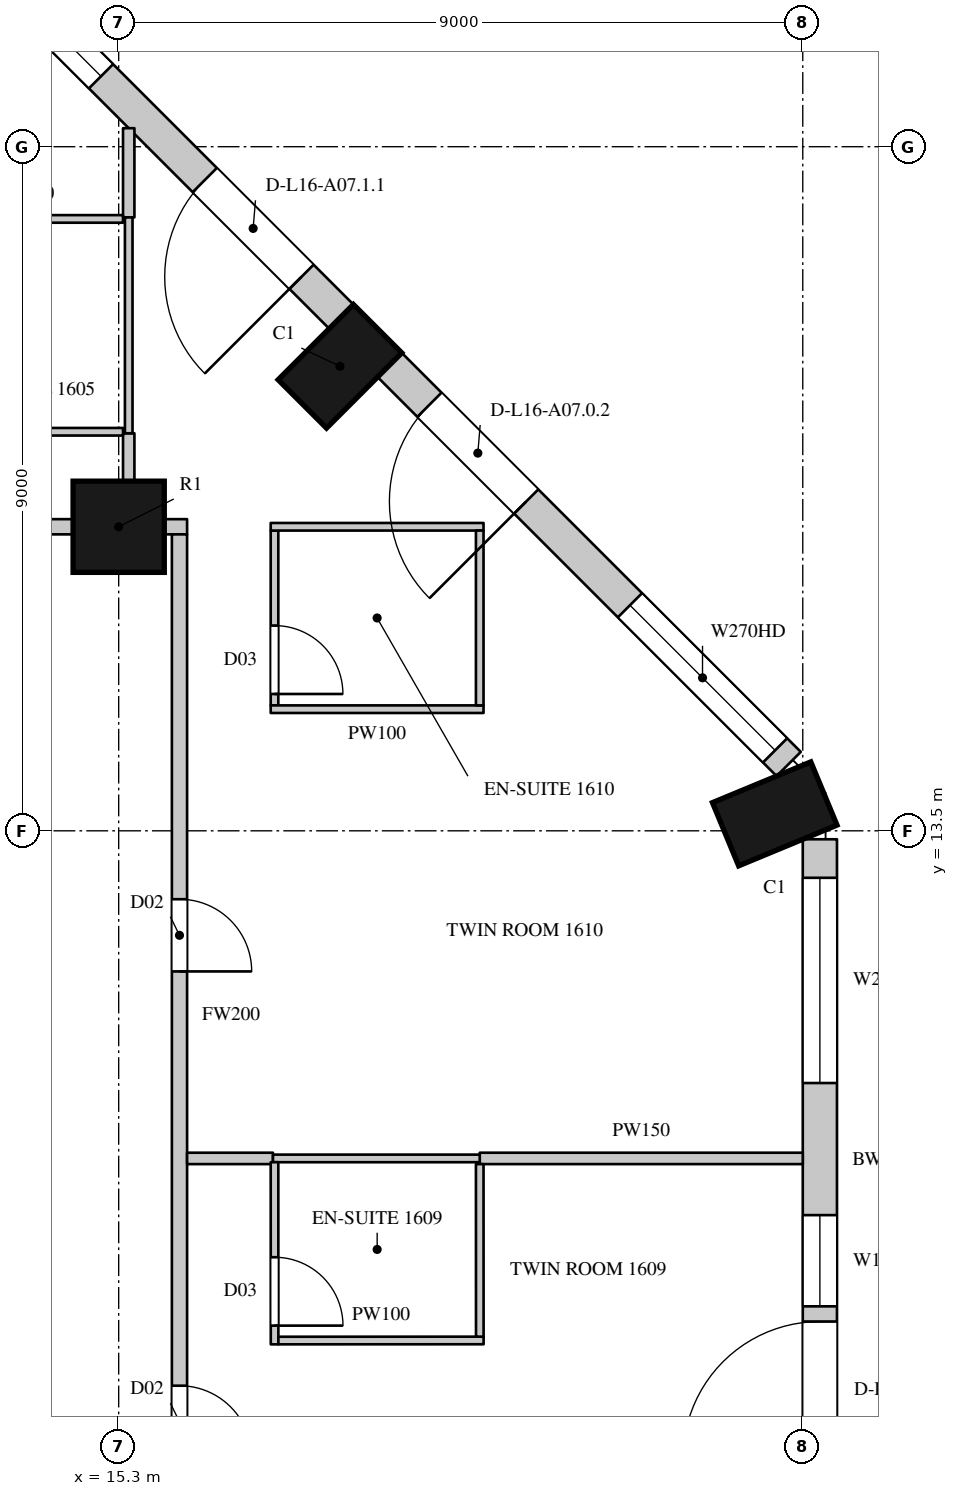
"""IFC4 building model, lengths in metres.
Left out: names, types, materials, properties, quantities, classifications, styles, units other than length and angle.
Written with IfcOpenShell. Run it as: python <this file> out.ifc"""

import sys

from ifc_helpers import new_model, si_unit, direction, frame, frame_2d, origin, origin_2d, place, context, subcontext, project, spatial, rectangle, circle, extrude, element, fill, save


model = new_model("IFC4")
c1 = context("Model", 3, precision=1e-05, world=origin(), true_north=direction((0.0, 1.0)))
c2 = subcontext(c1, "Body", "Model", "MODEL_VIEW")
j1 = project(units=[si_unit("LENGTHUNIT", "METRE"), si_unit("PLANEANGLEUNIT", "RADIAN")], contexts=[c1])
p1 = place(None, origin())
s1 = spatial("IfcSite", under=j1, at=p1, CompositionType="ELEMENT")
p2 = place(p1, origin())
s2 = spatial("IfcBuilding", under=s1, at=p2, CompositionType="ELEMENT")
p3 = place(p2, frame((0.0, 0.0, 87.9)))
s3 = spatial("IfcBuildingStorey", under=s2, at=p3, CompositionType="ELEMENT", Elevation=87.9)
for number, where, z_axis, x_axis in (
    (1, (23.931, 13.723, 0.0), (0.0, 0.0, 1.0), (-0.383, 0.924, 0.0)),
    (2, (18.211, 19.611, 0.0), (0.0, 0.0, 1.0), (-0.707, 0.707, 0.0)),
):
    element("IfcColumn", number, at=place(p3, frame(where, z_axis=z_axis, x_axis=x_axis)), inside=s3, PredefinedType="COLUMN", context=c2, shape_type="SweptSolid", body=[
        extrude(rectangle(XDim=0.9, YDim=1.4, at=origin_2d()), origin(), (0.0, 0.0, 1.0), 3.6),
    ])
p4 = place(p3, frame((15.3, 17.5, 0.0), z_axis=(0.0, 0.0, 1.0), x_axis=(1.0, 0.0, 0.0)))
e3 = element("IfcColumn", 3, at=p4, inside=s3, PredefinedType="COLUMN", context=c2, shape_type="SweptSolid", body=[
    extrude(circle(Radius=0.6, at=origin_2d()), origin(), (0.0, 0.0, 1.0), 3.6),
])
p5 = place(p3, frame((24.525, 4.95, 0.0), z_axis=(0.0, 0.0, 1.0), x_axis=(0.0, 1.0, 0.0)))
e4 = element("IfcWall", 4, at=p5, inside=s3, PredefinedType="SOLIDWALL", context=c2, shape_type="SweptSolid", body=[
    extrude(rectangle(XDim=8.439, YDim=0.45, at=frame_2d((4.219, 0.0))), origin(), (0.0, 0.0, 1.0), 3.3),
])
p6 = place(p5, frame((0.294, 0.0, 0.0)))
e5 = element("IfcOpeningElement", 5, at=p6, cuts=e4, PredefinedType="OPENING", context=c2, shape_type="SweptSolid", body=[
    extrude(rectangle(XDim=1.8, YDim=2.4, at=frame_2d((0.9, 1.2))), frame((0.0, 0.235, 0.0), z_axis=(0.0, -1.0, 0.0), x_axis=(1.0, 0.0, 0.0)), (0.0, 0.0, 1.0), 0.47),
])
p7 = place(p5, frame((2.294, 0.0, 1.05)))
e6 = element("IfcOpeningElement", 6, at=p7, cuts=e4, PredefinedType="OPENING", context=c2, shape_type="SweptSolid", body=[
    extrude(rectangle(XDim=1.2, YDim=2.0, at=frame_2d((0.6, 1.0))), frame((0.0, 0.235, 0.0), z_axis=(0.0, -1.0, 0.0), x_axis=(1.0, 0.0, 0.0)), (0.0, 0.0, 1.0), 0.47),
])
p8 = place(p5, frame((5.232, 0.0, 1.05)))
e7 = element("IfcOpeningElement", 7, at=p8, cuts=e4, PredefinedType="OPENING", context=c2, shape_type="SweptSolid", body=[
    extrude(rectangle(XDim=2.7, YDim=2.0, at=frame_2d((1.35, 1.0))), frame((0.0, 0.235, 0.0), z_axis=(0.0, -1.0, 0.0), x_axis=(1.0, 0.0, 0.0)), (0.0, 0.0, 1.0), 0.47),
])
p9 = place(p3, frame((24.115, 14.379, 0.0), z_axis=(0.0, 0.0, 1.0), x_axis=(-0.707106781187, 0.707106781187, 0.0)))
e8 = element("IfcWall", 8, at=p9, inside=s3, PredefinedType="SOLIDWALL", context=c2, shape_type="SweptSolid", body=[
    extrude(rectangle(XDim=7.424, YDim=0.45, at=frame_2d((3.712, 0.0))), origin(), (0.0, 0.0, 1.0), 3.3),
])
p10 = place(p9, frame((0.253, 0.0, 1.05)))
e9 = element("IfcOpeningElement", 9, at=p10, cuts=e8, PredefinedType="OPENING", context=c2, shape_type="SweptSolid", body=[
    extrude(rectangle(XDim=2.7, YDim=2.0, at=frame_2d((1.35, 1.0))), frame((0.0, 0.235, 0.0), z_axis=(0.0, -1.0, 0.0), x_axis=(1.0, 0.0, 0.0)), (0.0, 0.0, 1.0), 0.47),
])
p11 = place(p9, frame((4.884, 0.0, 0.0)))
e10 = element("IfcOpeningElement", 10, at=p11, cuts=e8, PredefinedType="OPENING", context=c2, shape_type="SweptSolid", body=[
    extrude(rectangle(XDim=1.8, YDim=2.4, at=frame_2d((0.9, 1.2))), frame((0.0, 0.235, 0.0), z_axis=(0.0, -1.0, 0.0), x_axis=(1.0, 0.0, 0.0)), (0.0, 0.0, 1.0), 0.47),
])
p12 = place(p3, frame((18.229, 20.265, 0.0), z_axis=(0.0, 0.0, 1.0), x_axis=(-0.707106781187, 0.707106781187, 0.0)))
e11 = element("IfcWall", 11, at=p12, inside=s3, PredefinedType="SOLIDWALL", context=c2, shape_type="SweptSolid", body=[
    extrude(rectangle(XDim=7.424, YDim=0.45, at=frame_2d((3.712, 0.0))), origin(), (0.0, 0.0, 1.0), 3.3),
])
p13 = place(p12, frame((0.74, 0.0, 0.0)))
e12 = element("IfcOpeningElement", 12, at=p13, cuts=e11, PredefinedType="OPENING", context=c2, shape_type="SweptSolid", body=[
    extrude(rectangle(XDim=1.8, YDim=2.4, at=frame_2d((0.9, 1.2))), frame((0.0, 0.235, 0.0), z_axis=(0.0, -1.0, 0.0), x_axis=(1.0, 0.0, 0.0)), (0.0, 0.0, 1.0), 0.47),
])
p14 = place(p12, frame((4.471, 0.0, 1.05)))
e13 = element("IfcOpeningElement", 13, at=p14, cuts=e11, PredefinedType="OPENING", context=c2, shape_type="SweptSolid", body=[
    extrude(rectangle(XDim=2.7, YDim=2.0, at=frame_2d((1.35, 1.0))), frame((0.0, 0.235, 0.0), z_axis=(0.0, -1.0, 0.0), x_axis=(1.0, 0.0, 0.0)), (0.0, 0.0, 1.0), 0.47),
])
p15 = place(p3, frame((23.15, 16.864, 0.0), z_axis=(0.0, 0.0, 1.0), x_axis=(-0.707106781187, 0.707106781187, 0.0)))
e14 = element("IfcWall", 14, at=p15, inside=s3, PredefinedType="SOLIDWALL", context=c2, shape_type="SweptSolid", body=[
    extrude(rectangle(XDim=1.445, YDim=0.45, at=frame_2d((0.722, 0.0))), origin(), (0.0, 0.0, 1.0), 0.6),
])
p16 = place(p3, frame((19.937, 20.078, 0.0), z_axis=(0.0, 0.0, 1.0), x_axis=(-0.707106781187, 0.707106781187, 0.0)))
e15 = element("IfcWall", 15, at=p16, inside=s3, PredefinedType="SOLIDWALL", context=c2, shape_type="SweptSolid", body=[
    extrude(rectangle(XDim=1.781, YDim=0.45, at=frame_2d((0.89, 0.0))), origin(), (0.0, 0.0, 1.0), 0.6),
])
p17 = place(p3, frame((16.486, 23.529, 0.0), z_axis=(0.0, 0.0, 1.0), x_axis=(-0.707022305137, 0.707191247145, 0.0)))
e16 = element("IfcWall", 16, at=p17, inside=s3, PredefinedType="SOLIDWALL", context=c2, shape_type="SweptSolid", body=[
    extrude(rectangle(XDim=1.445, YDim=0.45, at=frame_2d((0.723, 0.0))), origin(), (0.0, 0.0, 1.0), 0.6),
])
p18 = place(p3, frame((6.9, 17.5, 0.0), z_axis=(0.0, 0.0, 1.0), x_axis=(1.0, 0.0, 0.0)))
e17 = element("IfcWall", 17, at=p18, inside=s3, PredefinedType="PARTITIONING", context=c2, shape_type="SweptSolid", body=[
    extrude(rectangle(XDim=7.8, YDim=0.2, at=frame_2d((3.9, 0.0))), origin(), (0.0, 0.0, 1.0), 2.75),
])
p19 = place(p18, frame((1.45, 0.0, 0.0)))
e18 = element("IfcOpeningElement", 18, at=p19, cuts=e17, PredefinedType="OPENING", context=c2, shape_type="SweptSolid", body=[
    extrude(rectangle(XDim=1.1, YDim=2.4, at=frame_2d((0.55, 1.2))), frame((0.0, 0.11, 0.0), z_axis=(0.0, -1.0, 0.0), x_axis=(1.0, 0.0, 0.0)), (0.0, 0.0, 1.0), 0.22),
])
p20 = place(p3, frame((15.9, 17.5, 0.0), z_axis=(0.0, 0.0, 1.0), x_axis=(1.0, 0.0, 0.0)))
e19 = element("IfcWall", 19, at=p20, inside=s3, PredefinedType="PARTITIONING", context=c2, shape_type="SweptSolid", body=[
    extrude(rectangle(XDim=0.3, YDim=0.2, at=frame_2d((0.15, 0.0))), origin(), (0.0, 0.0, 1.0), 3.3),
])
p21 = place(p3, frame((16.1, 4.75, 0.0), z_axis=(0.0, 0.0, 1.0), x_axis=(0.0, 1.0, 0.0)))
e20 = element("IfcWall", 20, at=p21, inside=s3, PredefinedType="PARTITIONING", context=c2, shape_type="SweptSolid", body=[
    extrude(rectangle(XDim=12.65, YDim=0.2, at=frame_2d((6.325, 0.0))), origin(), (0.0, 0.0, 1.0), 3.3),
])
p22 = place(p21, frame((0.5, 0.0, 0.0)))
e21 = element("IfcOpeningElement", 21, at=p22, cuts=e20, PredefinedType="OPENING", context=c2, shape_type="SweptSolid", body=[
    extrude(rectangle(XDim=0.95, YDim=2.2, at=frame_2d((0.475, 1.1))), frame((0.0, 0.11, 0.0), z_axis=(0.0, -1.0, 0.0), x_axis=(1.0, 0.0, 0.0)), (0.0, 0.0, 1.0), 0.22),
])
p23 = place(p21, frame((6.9, 0.0, 0.0)))
e22 = element("IfcOpeningElement", 22, at=p23, cuts=e20, PredefinedType="OPENING", context=c2, shape_type="SweptSolid", body=[
    extrude(rectangle(XDim=0.95, YDim=2.2, at=frame_2d((0.475, 1.1))), frame((0.0, 0.11, 0.0), z_axis=(0.0, -1.0, 0.0), x_axis=(1.0, 0.0, 0.0)), (0.0, 0.0, 1.0), 0.22),
])
p24 = place(p3, frame((15.432, 18.094, 0.0), z_axis=(0.0, 0.0, 1.0), x_axis=(0.0, 1.0, 0.0)))
e23 = element("IfcWall", 23, at=p24, inside=s3, PredefinedType="PARTITIONING", context=c2, shape_type="SweptSolid", body=[
    extrude(rectangle(XDim=0.636, YDim=0.15, at=frame_2d((0.318, 0.0))), origin(), (0.0, 0.0, 1.0), 3.3),
])
p25 = place(p3, frame((15.432, 21.57, 0.0), z_axis=(0.0, 0.0, 1.0), x_axis=(0.0, 1.0, 0.0)))
e24 = element("IfcWall", 24, at=p25, inside=s3, PredefinedType="PARTITIONING", context=c2, shape_type="SweptSolid", body=[
    extrude(rectangle(XDim=1.174, YDim=0.15, at=frame_2d((0.587, 0.0))), origin(), (0.0, 0.0, 1.0), 3.3),
])
p26 = place(p3, frame((16.2, 9.19, 0.0), z_axis=(0.0, 0.0, 1.0), x_axis=(1.0, 0.0, 0.0)))
e25 = element("IfcWall", 25, at=p26, inside=s3, PredefinedType="PARTITIONING", context=c2, shape_type="SweptSolid", body=[
    extrude(rectangle(XDim=1.13, YDim=0.15, at=frame_2d((0.565, 0.0))), origin(), (0.0, 0.0, 1.0), 2.65),
])
p27 = place(p3, frame((20.05, 9.19, 0.0), z_axis=(0.0, 0.0, 1.0), x_axis=(1.0, 0.0, 0.0)))
e26 = element("IfcWall", 26, at=p27, inside=s3, PredefinedType="PARTITIONING", context=c2, shape_type="SweptSolid", body=[
    extrude(rectangle(XDim=4.25, YDim=0.15, at=frame_2d((2.125, 0.0))), origin(), (0.0, 0.0, 1.0), 2.65),
])
for number, where, z_axis, x_axis in (
    (27, (12.786, 18.75, 0.0), (0.0, 0.0, 1.0), (1.0, 0.0, 0.0)),
    (28, (12.786, 21.55, 0.0), (0.0, 0.0, 1.0), (1.0, 0.0, 0.0)),
):
    element("IfcWall", number, at=place(p3, frame(where, z_axis=z_axis, x_axis=x_axis)), inside=s3, PredefinedType="PARTITIONING", context=c2, shape_type="SweptSolid", body=[
        extrude(rectangle(XDim=2.571, YDim=0.1, at=frame_2d((1.286, 0.0))), origin(), (0.0, 0.0, 1.0), 3.3),
    ])
p28 = place(p3, frame((15.432, 18.73, 0.0), z_axis=(0.0, 0.0, 1.0), x_axis=(0.0, 1.0, 0.0)))
e29 = element("IfcWall", 29, at=p28, inside=s3, PredefinedType="PARTITIONING", context=c2, shape_type="SweptSolid", body=[
    extrude(rectangle(XDim=2.84, YDim=0.1, at=frame_2d((1.42, 0.0))), origin(), (0.0, 0.0, 1.0), 3.3),
])
p29 = place(p3, frame((17.33, 9.19, 0.0), z_axis=(0.0, 0.0, 1.0), x_axis=(1.0, 0.0, 0.0)))
e30 = element("IfcWall", 30, at=p29, inside=s3, PredefinedType="PARTITIONING", context=c2, shape_type="SweptSolid", body=[
    extrude(rectangle(XDim=2.72, YDim=0.1, at=frame_2d((1.36, 0.0))), origin(), (0.0, 0.0, 1.0), 2.65),
])
p30 = place(p3, frame((17.35, 9.14, 0.0), z_axis=(0.0, 0.0, 1.0), x_axis=(0.000407580973, -0.999999916939, 0.0)))
e31 = element("IfcWall", 31, at=p30, inside=s3, PredefinedType="PARTITIONING", context=c2, shape_type="SweptSolid", body=[
    extrude(rectangle(XDim=2.396, YDim=0.1, at=frame_2d((1.198, 0.0))), origin(), (0.0, 0.0, 1.0), 3.3),
])
p31 = place(p30, frame((1.25, 0.0, 0.0)))
e32 = element("IfcOpeningElement", 32, at=p31, cuts=e31, PredefinedType="OPENING", context=c2, shape_type="SweptSolid", body=[
    extrude(rectangle(XDim=0.9, YDim=2.2, at=frame_2d((0.45, 1.1))), frame((0.0, 0.06, 0.0), z_axis=(0.0, -1.0, 0.0), x_axis=(1.0, 0.0, 0.0)), (0.0, 0.0, 1.0), 0.12),
])
p32 = place(p3, frame((17.35, 15.15, 0.0), z_axis=(0.0, 0.0, 1.0), x_axis=(0.0, 1.0, 0.0)))
e33 = element("IfcWall", 33, at=p32, inside=s3, PredefinedType="PARTITIONING", context=c2, shape_type="SweptSolid", body=[
    extrude(rectangle(XDim=2.3, YDim=0.1, at=frame_2d((1.15, 0.0))), origin(), (0.0, 0.0, 1.0), 3.3),
])
p33 = place(p32, frame((0.15, 0.0, 0.0)))
e34 = element("IfcOpeningElement", 34, at=p33, cuts=e33, PredefinedType="OPENING", context=c2, shape_type="SweptSolid", body=[
    extrude(rectangle(XDim=0.9, YDim=2.2, at=frame_2d((0.45, 1.1))), frame((0.0, 0.06, 0.0), z_axis=(0.0, -1.0, 0.0), x_axis=(1.0, 0.0, 0.0)), (0.0, 0.0, 1.0), 0.12),
])
for number, where, z_axis, x_axis in (
    (35, (17.3, 15.1, 0.0), (0.0, 0.0, 1.0), (1.0, 0.0, 0.0)),
    (36, (17.3, 17.5, 0.0), (0.0, 0.0, 1.0), (1.0, 0.0, 0.0)),
):
    element("IfcWall", number, at=place(p3, frame(where, z_axis=z_axis, x_axis=x_axis)), inside=s3, PredefinedType="PARTITIONING", context=c2, shape_type="SweptSolid", body=[
        extrude(rectangle(XDim=2.8, YDim=0.1, at=frame_2d((1.4, 0.0))), origin(), (0.0, 0.0, 1.0), 3.3),
    ])
p34 = place(p3, frame((17.401, 6.794, 0.0), z_axis=(0.0, 0.0, 1.0), x_axis=(0.9999999346, 0.000361663629, 0.0)))
e37 = element("IfcWall", 37, at=p34, inside=s3, PredefinedType="PARTITIONING", context=c2, shape_type="SweptSolid", body=[
    extrude(rectangle(XDim=2.7, YDim=0.1, at=frame_2d((1.35, 0.0))), origin(), (0.0, 0.0, 1.0), 3.3),
])
p35 = place(p3, frame((20.05, 9.115, 0.0), z_axis=(0.0, 0.0, 1.0), x_axis=(0.000430200003, -0.999999907464, 0.0)))
e38 = element("IfcWall", 38, at=p35, inside=s3, PredefinedType="PARTITIONING", context=c2, shape_type="SweptSolid", body=[
    extrude(rectangle(XDim=2.27, YDim=0.1, at=frame_2d((1.135, 0.0))), origin(), (0.0, 0.0, 1.0), 3.3),
])
p36 = place(p3, frame((20.05, 15.15, 0.0), z_axis=(0.0, 0.0, 1.0), x_axis=(0.0, 1.0, 0.0)))
e39 = element("IfcWall", 39, at=p36, inside=s3, PredefinedType="PARTITIONING", context=c2, shape_type="SweptSolid", body=[
    extrude(rectangle(XDim=2.3, YDim=0.1, at=frame_2d((1.15, 0.0))), origin(), (0.0, 0.0, 1.0), 3.3),
])
p37 = place(p6, origin())
e40 = element("IfcDoor", 40, at=p37, inside=s3, OperationType="SLIDING_TO_LEFT", PredefinedType="DOOR", context=c2, shape_type="SweptSolid", body=[
    extrude(rectangle(XDim=1.8, YDim=2.4, at=frame_2d((0.9, 1.2))), frame((0.0, 0.13, 0.0), z_axis=(0.0, -1.0, 0.0), x_axis=(1.0, 0.0, 0.0)), (0.0, 0.0, 1.0), 0.05),
])
fill(e5, e40)
p38 = place(p7, origin())
e41 = element("IfcWindow", 41, at=p38, inside=s3, PartitioningType="SINGLE_PANEL", PredefinedType="WINDOW", context=c2, shape_type="SweptSolid", body=[
    extrude(rectangle(XDim=1.2, YDim=2.0, at=frame_2d((0.6, 1.0))), frame((0.0, 0.135, 0.0), z_axis=(0.0, -1.0, 0.0), x_axis=(1.0, 0.0, 0.0)), (0.0, 0.0, 1.0), 0.06),
])
fill(e6, e41)
p39 = place(p8, origin())
e42 = element("IfcWindow", 42, at=p39, inside=s3, PartitioningType="SINGLE_PANEL", PredefinedType="WINDOW", context=c2, shape_type="SweptSolid", body=[
    extrude(rectangle(XDim=2.7, YDim=2.0, at=frame_2d((1.35, 1.0))), frame((0.0, 0.135, 0.0), z_axis=(0.0, -1.0, 0.0), x_axis=(1.0, 0.0, 0.0)), (0.0, 0.0, 1.0), 0.06),
])
fill(e7, e42)
p40 = place(p10, origin())
e43 = element("IfcWindow", 43, at=p40, inside=s3, PartitioningType="SINGLE_PANEL", PredefinedType="WINDOW", context=c2, shape_type="SweptSolid", body=[
    extrude(rectangle(XDim=2.7, YDim=2.0, at=frame_2d((1.35, 1.0))), frame((0.0, 0.135, 0.0), z_axis=(0.0, -1.0, 0.0), x_axis=(1.0, 0.0, 0.0)), (0.0, 0.0, 1.0), 0.06),
])
fill(e9, e43)
p41 = place(p11, origin())
e44 = element("IfcDoor", 44, at=p41, inside=s3, OperationType="SLIDING_TO_LEFT", PredefinedType="DOOR", context=c2, shape_type="SweptSolid", body=[
    extrude(rectangle(XDim=1.8, YDim=2.4, at=frame_2d((0.9, 1.2))), frame((0.0, 0.13, 0.0), z_axis=(0.0, -1.0, 0.0), x_axis=(1.0, 0.0, 0.0)), (0.0, 0.0, 1.0), 0.05),
])
fill(e10, e44)
p42 = place(p13, origin())
e45 = element("IfcDoor", 45, at=p42, inside=s3, OperationType="SLIDING_TO_LEFT", PredefinedType="DOOR", context=c2, shape_type="SweptSolid", body=[
    extrude(rectangle(XDim=1.8, YDim=2.4, at=frame_2d((0.9, 1.2))), frame((0.0, 0.13, 0.0), z_axis=(0.0, -1.0, 0.0), x_axis=(1.0, 0.0, 0.0)), (0.0, 0.0, 1.0), 0.05),
])
fill(e12, e45)
p43 = place(p14, origin())
e46 = element("IfcWindow", 46, at=p43, inside=s3, PartitioningType="SINGLE_PANEL", PredefinedType="WINDOW", context=c2, shape_type="SweptSolid", body=[
    extrude(rectangle(XDim=2.7, YDim=2.0, at=frame_2d((1.35, 1.0))), frame((0.0, 0.135, 0.0), z_axis=(0.0, -1.0, 0.0), x_axis=(1.0, 0.0, 0.0)), (0.0, 0.0, 1.0), 0.06),
])
fill(e13, e46)
p44 = place(p22, origin())
e47 = element("IfcDoor", 47, at=p44, inside=s3, OperationType="SINGLE_SWING_RIGHT", PredefinedType="DOOR", context=c2, shape_type="SweptSolid", body=[
    extrude(rectangle(XDim=0.95, YDim=2.2, at=frame_2d((0.475, 1.1))), frame((0.0, 0.025, 0.0), z_axis=(0.0, -1.0, 0.0), x_axis=(1.0, 0.0, 0.0)), (0.0, 0.0, 1.0), 0.05),
])
fill(e21, e47)
p45 = place(p31, origin())
e48 = element("IfcDoor", 48, at=p45, inside=s3, OperationType="SINGLE_SWING_RIGHT", PredefinedType="DOOR", context=c2, shape_type="SweptSolid", body=[
    extrude(rectangle(XDim=0.9, YDim=2.2, at=frame_2d((0.45, 1.1))), frame((0.0, 0.025, 0.0), z_axis=(0.0, -1.0, 0.0), x_axis=(1.0, 0.0, 0.0)), (0.0, 0.0, 1.0), 0.05),
])
fill(e32, e48)
p46 = place(p23, origin())
e49 = element("IfcDoor", 49, at=p46, inside=s3, OperationType="SINGLE_SWING_RIGHT", PredefinedType="DOOR", context=c2, shape_type="SweptSolid", body=[
    extrude(rectangle(XDim=0.95, YDim=2.2, at=frame_2d((0.475, 1.1))), frame((0.0, 0.025, 0.0), z_axis=(0.0, -1.0, 0.0), x_axis=(1.0, 0.0, 0.0)), (0.0, 0.0, 1.0), 0.05),
])
fill(e22, e49)
p47 = place(p33, origin())
e50 = element("IfcDoor", 50, at=p47, inside=s3, OperationType="SINGLE_SWING_RIGHT", PredefinedType="DOOR", context=c2, shape_type="SweptSolid", body=[
    extrude(rectangle(XDim=0.9, YDim=2.2, at=frame_2d((0.45, 1.1))), frame((0.0, 0.025, 0.0), z_axis=(0.0, -1.0, 0.0), x_axis=(1.0, 0.0, 0.0)), (0.0, 0.0, 1.0), 0.05),
])
fill(e34, e50)
save(model, sys.argv[1])
